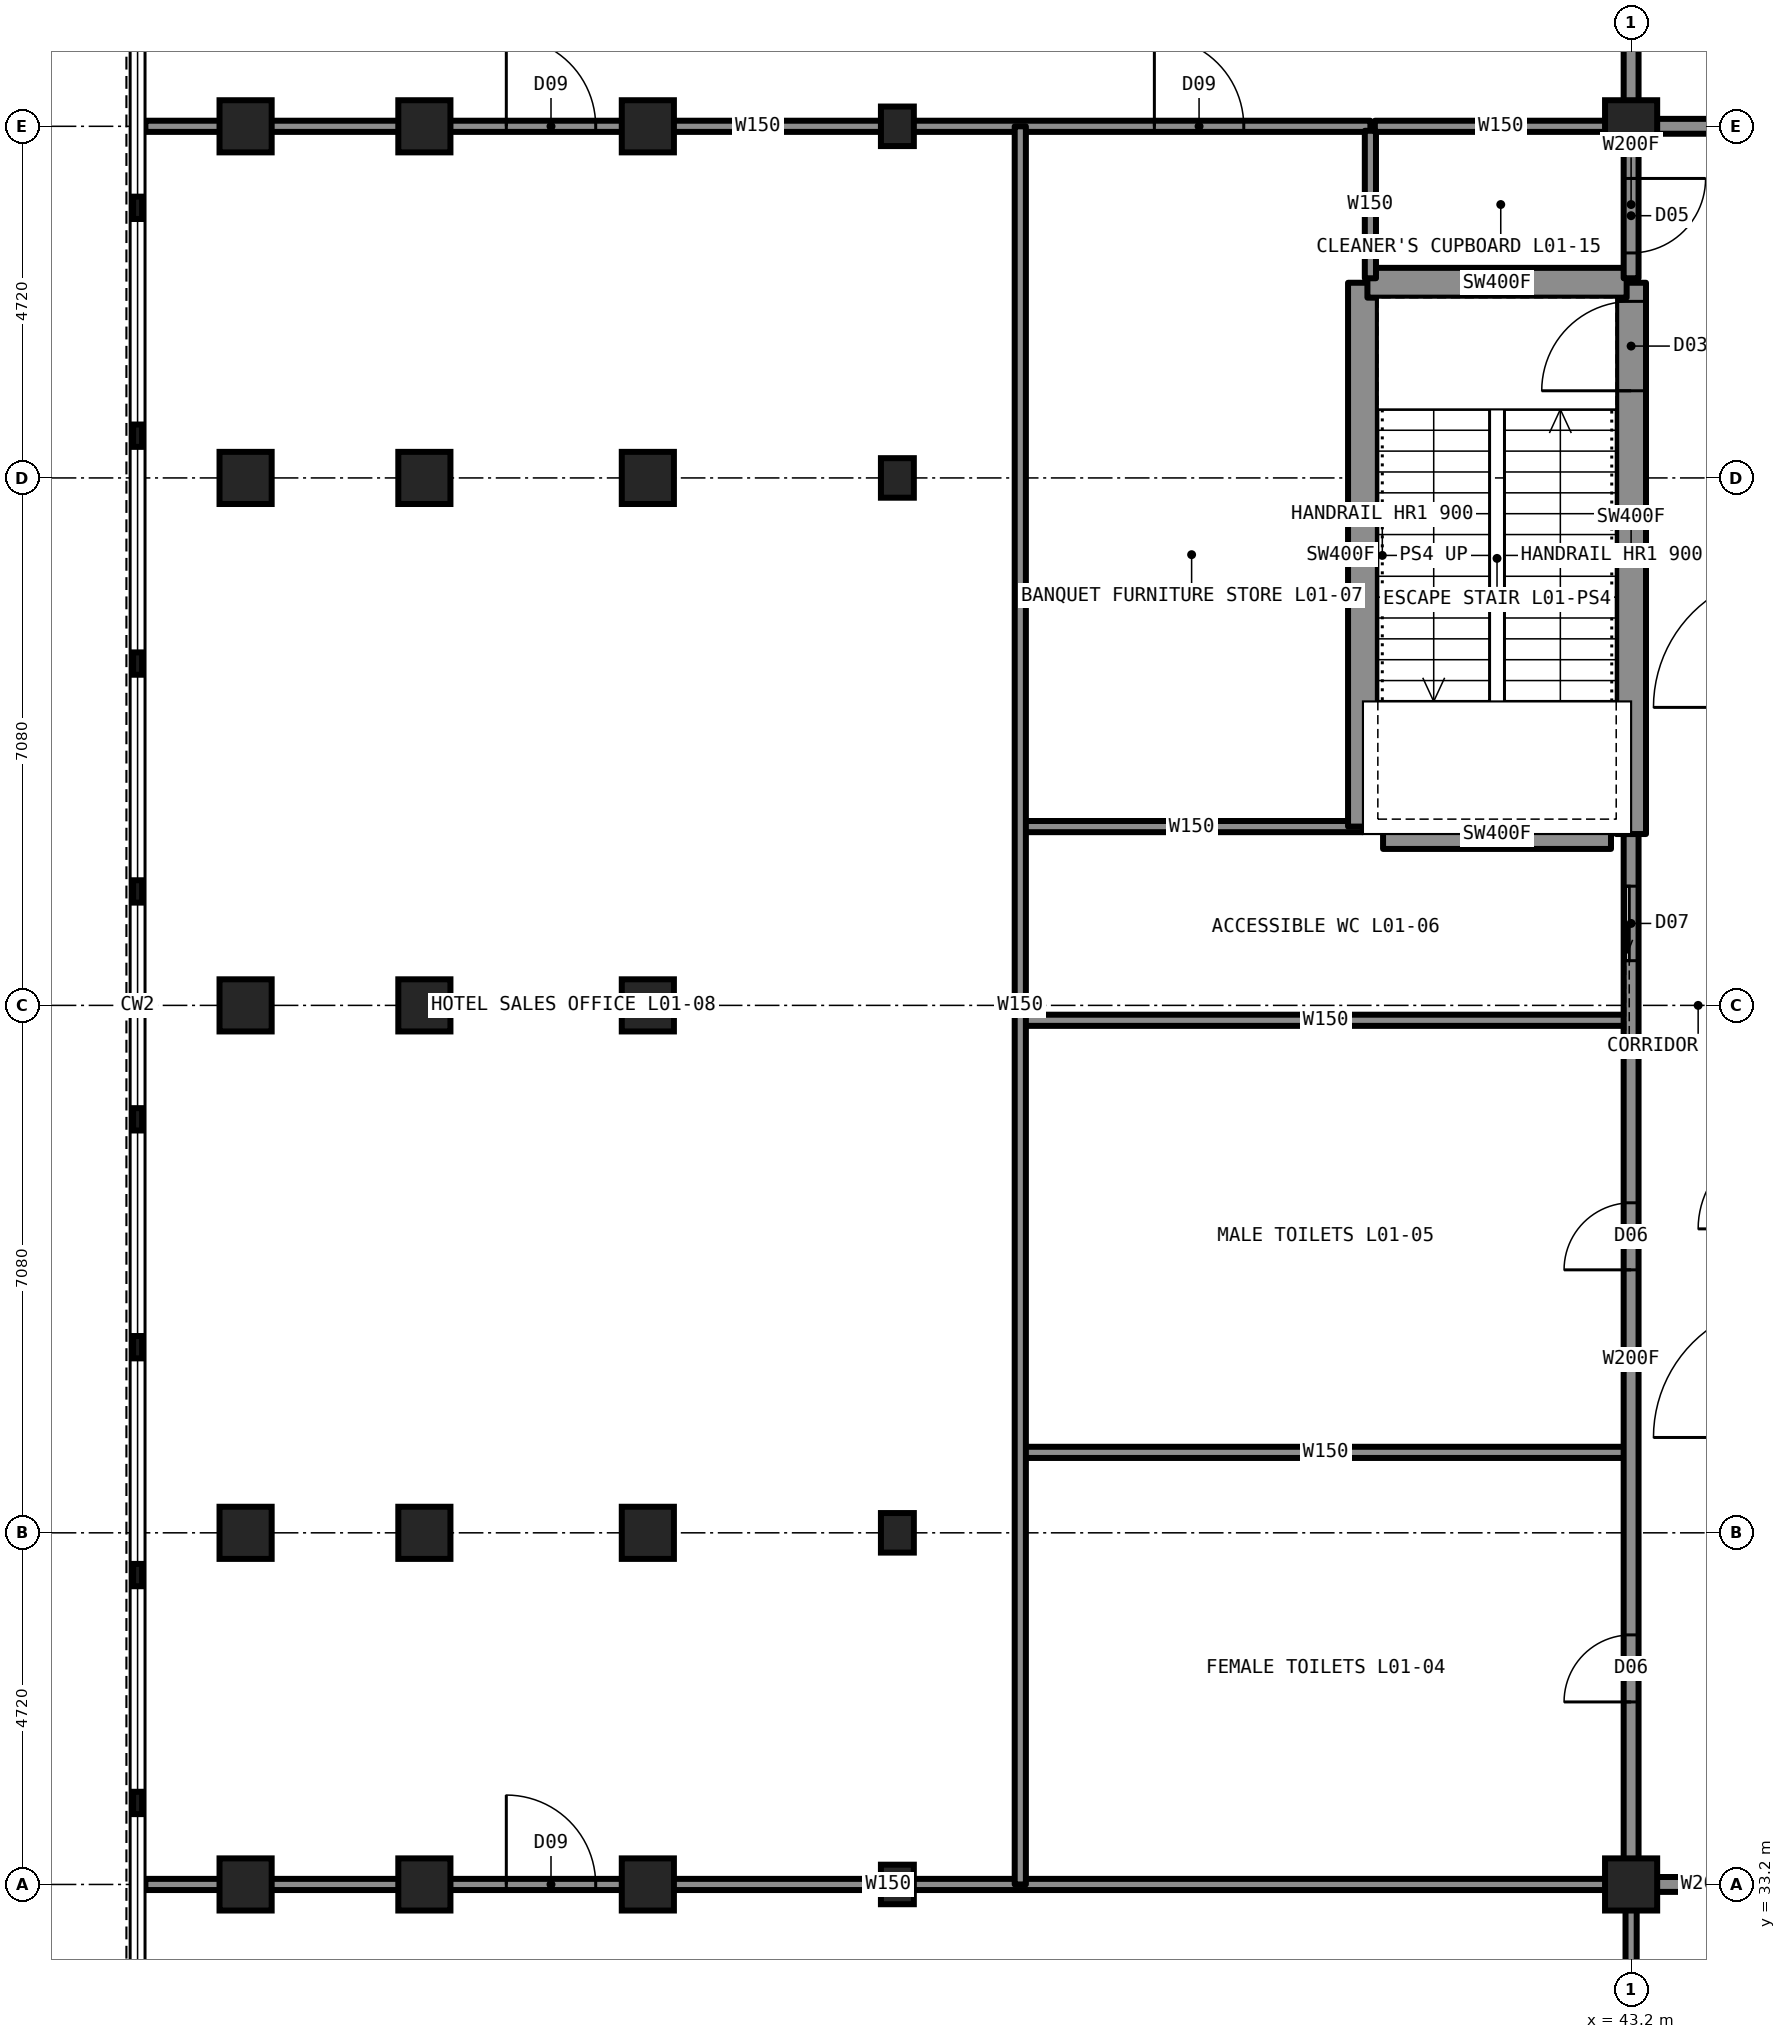
"""IFC4 building model, lengths in metres.
Left out: names, types, materials, properties, quantities, classifications, styles, units other than length and angle.
Written with IfcOpenShell. Run it as: python <this file> out.ifc"""

import sys

from ifc_helpers import new_model, si_unit, direction, frame, frame_2d, origin, origin_2d, place, context, subcontext, project, spatial, rectangle, hollow_rectangle, i_section, extrude, element, fill, save


model = new_model("IFC4")
c1 = context("Model", 3, precision=1e-05, world=origin(), true_north=direction((0.0, 1.0)))
c2 = subcontext(c1, "Body", "Model", "MODEL_VIEW")
j1 = project(units=[si_unit("LENGTHUNIT", "METRE"), si_unit("PLANEANGLEUNIT", "RADIAN")], contexts=[c1])
p1 = place(None, origin())
s1 = spatial("IfcSite", under=j1, at=p1, CompositionType="ELEMENT")
p2 = place(p1, origin())
s2 = spatial("IfcBuilding", under=s1, at=p2, CompositionType="ELEMENT")
p3 = place(p2, frame((0.0, 0.0, 5.6)))
s3 = spatial("IfcBuildingStorey", under=s2, at=p3, CompositionType="ELEMENT", Elevation=5.6)
for number, where, z_axis, x_axis in (
    (1, (33.35, 33.2, 0.0), (0.0, 0.0, 1.0), (1.0, 0.0, 0.0)),
    (2, (33.35, 37.92, 0.0), (0.0, 0.0, 1.0), (1.0, 0.0, 0.0)),
    (3, (33.35, 52.08, 0.0), (0.0, 0.0, 1.0), (1.0, 0.0, 0.0)),
    (4, (33.35, 56.8, 0.0), (0.0, 0.0, 1.0), (1.0, 0.0, 0.0)),
):
    element("IfcColumn", number, at=place(p3, frame(where, z_axis=z_axis, x_axis=x_axis)), inside=s3, PredefinedType="COLUMN", context=c2, shape_type="SweptSolid", body=[
        extrude(i_section(OverallWidth=0.442, OverallDepth=0.531, WebThickness=0.066, FlangeThickness=0.106, at=origin_2d()), origin(), (0.0, 0.0, 1.0), 5.4),
    ])
for number, where, z_axis, x_axis in (
    (5, (43.2, 33.2, 0.0), (0.0, 0.0, 1.0), (1.0, 0.0, 0.0)),
    (6, (43.2, 56.8, 0.0), (0.0, 0.0, 1.0), (1.0, 0.0, 0.0)),
):
    element("IfcColumn", number, at=place(p3, frame(where, z_axis=z_axis, x_axis=x_axis)), inside=s3, PredefinedType="COLUMN", context=c2, shape_type="SweptSolid", body=[
        extrude(hollow_rectangle(XDim=0.7, YDim=0.7, WallThickness=0.06, at=origin_2d()), origin(), (0.0, 0.0, 1.0), 5.4),
    ])
for number, where, z_axis, x_axis in (
    (7, (24.6, 33.2, 0.0), (0.0, 0.0, 1.0), (1.0, 0.0, 0.0)),
    (8, (24.6, 37.92, 0.0), (0.0, 0.0, 1.0), (1.0, 0.0, 0.0)),
    (9, (24.6, 45.0, 0.0), (0.0, 0.0, 1.0), (1.0, 0.0, 0.0)),
    (10, (24.6, 52.08, 0.0), (0.0, 0.0, 1.0), (1.0, 0.0, 0.0)),
    (11, (24.6, 56.8, 0.0), (0.0, 0.0, 1.0), (1.0, 0.0, 0.0)),
    (12, (27.0, 33.2, 0.0), (0.0, 0.0, 1.0), (1.0, 0.0, 0.0)),
    (13, (27.0, 37.92, 0.0), (0.0, 0.0, 1.0), (1.0, 0.0, 0.0)),
    (14, (27.0, 45.0, 0.0), (0.0, 0.0, 1.0), (1.0, 0.0, 0.0)),
    (15, (27.0, 52.08, 0.0), (0.0, 0.0, 1.0), (1.0, 0.0, 0.0)),
    (16, (27.0, 56.8, 0.0), (0.0, 0.0, 1.0), (1.0, 0.0, 0.0)),
    (17, (30.0, 33.2, 0.0), (0.0, 0.0, 1.0), (1.0, 0.0, 0.0)),
    (18, (30.0, 37.92, 0.0), (0.0, 0.0, 1.0), (1.0, 0.0, 0.0)),
    (19, (30.0, 45.0, 0.0), (0.0, 0.0, 1.0), (1.0, 0.0, 0.0)),
    (20, (30.0, 52.08, 0.0), (0.0, 0.0, 1.0), (1.0, 0.0, 0.0)),
    (21, (30.0, 56.8, 0.0), (0.0, 0.0, 1.0), (1.0, 0.0, 0.0)),
):
    element("IfcColumn", number, at=place(p3, frame(where, z_axis=z_axis, x_axis=x_axis)), inside=s3, PredefinedType="COLUMN", context=c2, shape_type="SweptSolid", body=[
        extrude(rectangle(XDim=0.7, YDim=0.7, at=origin_2d()), origin(), (0.0, 0.0, 1.0), 5.4),
    ])
p4 = place(p3, frame((35.0, 44.8, 0.0), z_axis=(0.0, 0.0, 1.0), x_axis=(1.0, 0.0, 0.0)))
e22 = element("IfcWall", 22, at=p4, inside=s3, PredefinedType="PARTITIONING", context=c2, shape_type="SweptSolid", body=[
    extrude(rectangle(XDim=8.2, YDim=0.15, at=frame_2d((4.1, 0.0))), origin(), (0.0, 0.0, 1.0), 5.05),
])
p5 = place(p3, frame((43.2, 33.2, 0.0), z_axis=(0.0, 0.0, 1.0), x_axis=(1.0, 0.0, 0.0)))
e23 = element("IfcWall", 23, at=p5, inside=s3, PredefinedType="PARTITIONING", context=c2, shape_type="SweptSolid", body=[
    extrude(rectangle(XDim=2.1, YDim=0.2, at=frame_2d((1.05, 0.0))), origin(), (0.0, 0.0, 1.0), 5.05),
])
p6 = place(p3, frame((23.255, 33.2, 0.0), z_axis=(0.0, 0.0, 1.0), x_axis=(1.0, 0.0, 0.0)))
e24 = element("IfcWall", 24, at=p6, inside=s3, PredefinedType="PARTITIONING", context=c2, shape_type="SweptSolid", body=[
    extrude(rectangle(XDim=19.945, YDim=0.15, at=frame_2d((9.973, 0.0))), origin(), (0.0, 0.0, 1.0), 5.05),
])
p7 = place(p6, frame((4.845, 0.0, 0.0)))
e25 = element("IfcOpeningElement", 25, at=p7, cuts=e24, PredefinedType="OPENING", context=c2, shape_type="SweptSolid", body=[
    extrude(rectangle(XDim=1.2, YDim=2.2, at=frame_2d((0.6, 1.1))), frame((0.0, 0.085, 0.0), z_axis=(0.0, -1.0, 0.0), x_axis=(1.0, 0.0, 0.0)), (0.0, 0.0, 1.0), 0.17),
])
p8 = place(p3, frame((35.0, 39.0, 0.0), z_axis=(0.0, 0.0, 1.0), x_axis=(1.0, 0.0, 0.0)))
e26 = element("IfcWall", 26, at=p8, inside=s3, PredefinedType="PARTITIONING", context=c2, shape_type="SweptSolid", body=[
    extrude(rectangle(XDim=8.2, YDim=0.15, at=frame_2d((4.1, 0.0))), origin(), (0.0, 0.0, 1.0), 5.05),
])
p9 = place(p3, frame((43.2, 56.8, 0.0), z_axis=(0.0, 0.0, 1.0), x_axis=(1.0, 0.0, 0.0)))
e27 = element("IfcWall", 27, at=p9, inside=s3, PredefinedType="PARTITIONING", context=c2, shape_type="SweptSolid", body=[
    extrude(rectangle(XDim=14.1, YDim=0.2, at=frame_2d((7.05, 0.0))), origin(), (0.0, 0.0, 1.0), 5.05),
])
p10 = place(p9, frame((5.3, 0.0, 0.0)))
e28 = element("IfcOpeningElement", 28, at=p10, cuts=e27, PredefinedType="OPENING", context=c2, shape_type="SweptSolid", body=[
    extrude(rectangle(XDim=1.0, YDim=2.1, at=frame_2d((0.5, 1.05))), frame((0.0, 0.11, 0.0), z_axis=(0.0, -1.0, 0.0), x_axis=(1.0, 0.0, 0.0)), (0.0, 0.0, 1.0), 0.22),
])
p11 = place(p3, frame((23.255, 56.8, 0.0), z_axis=(0.0, 0.0, 1.0), x_axis=(1.0, 0.0, 0.0)))
e29 = element("IfcWall", 29, at=p11, inside=s3, PredefinedType="PARTITIONING", context=c2, shape_type="SweptSolid", body=[
    extrude(rectangle(XDim=16.445, YDim=0.15, at=frame_2d((8.223, 0.0))), origin(), (0.0, 0.0, 1.0), 5.05),
])
p12 = place(p11, frame((13.545, 0.0, 0.0)))
e30 = element("IfcOpeningElement", 30, at=p12, cuts=e29, PredefinedType="OPENING", context=c2, shape_type="SweptSolid", body=[
    extrude(rectangle(XDim=1.2, YDim=2.2, at=frame_2d((0.6, 1.1))), frame((0.0, 0.085, 0.0), z_axis=(0.0, -1.0, 0.0), x_axis=(1.0, 0.0, 0.0)), (0.0, 0.0, 1.0), 0.17),
])
p13 = place(p11, frame((4.845, 0.0, 0.0)))
e31 = element("IfcOpeningElement", 31, at=p13, cuts=e29, PredefinedType="OPENING", context=c2, shape_type="SweptSolid", body=[
    extrude(rectangle(XDim=1.2, YDim=2.2, at=frame_2d((0.6, 1.1))), frame((0.0, 0.085, 0.0), z_axis=(0.0, -1.0, 0.0), x_axis=(1.0, 0.0, 0.0)), (0.0, 0.0, 1.0), 0.17),
])
p14 = place(p3, frame((39.87, 47.3, 0.0), z_axis=(0.0, 0.0, 1.0), x_axis=(1.0, 0.0, 0.0)))
e32 = element("IfcWall", 32, at=p14, inside=s3, PredefinedType="SHEAR", context=c2, shape_type="SweptSolid", body=[
    extrude(rectangle(XDim=3.06, YDim=0.4, at=frame_2d((1.53, 0.0))), origin(), (0.0, 0.0, 1.0), 5.4),
])
p15 = place(p3, frame((35.0, 47.4, 0.0), z_axis=(0.0, 0.0, 1.0), x_axis=(1.0, 0.0, 0.0)))
e33 = element("IfcWall", 33, at=p15, inside=s3, PredefinedType="PARTITIONING", context=c2, shape_type="SweptSolid", body=[
    extrude(rectangle(XDim=4.6, YDim=0.15, at=frame_2d((2.3, 0.0))), origin(), (0.0, 0.0, 1.0), 5.05),
])
p16 = place(p3, frame((43.2, 33.2, 0.0), z_axis=(0.0, 0.0, 1.0), x_axis=(0.0, 1.0, 0.0)))
e34 = element("IfcWall", 34, at=p16, inside=s3, PredefinedType="PARTITIONING", context=c2, shape_type="SweptSolid", body=[
    extrude(rectangle(XDim=14.1, YDim=0.2, at=frame_2d((7.05, 0.0))), origin(), (0.0, 0.0, 1.0), 5.05),
])
p17 = place(p16, frame((12.4, 0.0, 0.0)))
e35 = element("IfcOpeningElement", 35, at=p17, cuts=e34, PredefinedType="OPENING", context=c2, shape_type="SweptSolid", body=[
    extrude(rectangle(XDim=1.0, YDim=2.1, at=frame_2d((0.5, 1.05))), frame((0.0, 0.11, 0.0), z_axis=(0.0, -1.0, 0.0), x_axis=(1.0, 0.0, 0.0)), (0.0, 0.0, 1.0), 0.22),
])
p18 = place(p16, frame((2.45, 0.0, 0.0)))
e36 = element("IfcOpeningElement", 36, at=p18, cuts=e34, PredefinedType="OPENING", context=c2, shape_type="SweptSolid", body=[
    extrude(rectangle(XDim=0.9, YDim=2.1, at=frame_2d((0.45, 1.05))), frame((0.0, 0.11, 0.0), z_axis=(0.0, -1.0, 0.0), x_axis=(1.0, 0.0, 0.0)), (0.0, 0.0, 1.0), 0.22),
])
p19 = place(p16, frame((8.25, 0.0, 0.0)))
e37 = element("IfcOpeningElement", 37, at=p19, cuts=e34, PredefinedType="OPENING", context=c2, shape_type="SweptSolid", body=[
    extrude(rectangle(XDim=0.9, YDim=2.1, at=frame_2d((0.45, 1.05))), frame((0.0, 0.11, 0.0), z_axis=(0.0, -1.0, 0.0), x_axis=(1.0, 0.0, 0.0)), (0.0, 0.0, 1.0), 0.22),
])
p20 = place(p3, frame((43.2, 56.8, 0.0), z_axis=(0.0, 0.0, 1.0), x_axis=(0.0, 1.0, 0.0)))
e38 = element("IfcWall", 38, at=p20, inside=s3, PredefinedType="PARTITIONING", context=c2, shape_type="SweptSolid", body=[
    extrude(rectangle(XDim=13.9, YDim=0.2, at=frame_2d((6.95, 0.0))), origin(), (0.0, 0.0, 1.0), 5.05),
])
p21 = place(p20, frame((6.6, 0.0, 0.0)))
e39 = element("IfcOpeningElement", 39, at=p21, cuts=e38, PredefinedType="OPENING", context=c2, shape_type="SweptSolid", body=[
    extrude(rectangle(XDim=1.2, YDim=2.2, at=frame_2d((0.6, 1.1))), frame((0.0, 0.11, 0.0), z_axis=(0.0, -1.0, 0.0), x_axis=(1.0, 0.0, 0.0)), (0.0, 0.0, 1.0), 0.22),
])
p22 = place(p3, frame((43.2, 19.3, 0.0), z_axis=(0.0, 0.0, 1.0), x_axis=(0.0, 1.0, 0.0)))
e40 = element("IfcWall", 40, at=p22, inside=s3, PredefinedType="PARTITIONING", context=c2, shape_type="SweptSolid", body=[
    extrude(rectangle(XDim=13.9, YDim=0.15, at=frame_2d((6.95, 0.0))), origin(), (0.0, 0.0, 1.0), 5.05),
])
p23 = place(p22, frame((5.9, 0.0, 0.0)))
e41 = element("IfcOpeningElement", 41, at=p23, cuts=e40, PredefinedType="OPENING", context=c2, shape_type="SweptSolid", body=[
    extrude(rectangle(XDim=1.6, YDim=2.4, at=frame_2d((0.8, 1.2))), frame((0.0, 0.085, 0.0), z_axis=(0.0, -1.0, 0.0), x_axis=(1.0, 0.0, 0.0)), (0.0, 0.0, 1.0), 0.17),
])
p24 = place(p3, frame((43.2, 47.3, 0.0), z_axis=(0.0, 0.0, 1.0), x_axis=(0.0, 1.0, 0.0)))
e42 = element("IfcWall", 42, at=p24, inside=s3, PredefinedType="SHEAR", context=c2, shape_type="SweptSolid", body=[
    extrude(rectangle(XDim=7.4, YDim=0.4, at=frame_2d((3.7, 0.0))), origin(), (0.0, 0.0, 1.0), 5.4),
])
p25 = place(p24, frame((5.95, 0.0, 0.0)))
e43 = element("IfcOpeningElement", 43, at=p25, cuts=e42, PredefinedType="OPENING", context=c2, shape_type="SweptSolid", body=[
    extrude(rectangle(XDim=1.2, YDim=2.2, at=frame_2d((0.6, 1.1))), frame((0.0, 0.21, 0.0), z_axis=(0.0, -1.0, 0.0), x_axis=(1.0, 0.0, 0.0)), (0.0, 0.0, 1.0), 0.42),
])
p26 = place(p3, frame((39.6, 47.4, 0.0), z_axis=(0.0, 0.0, 1.0), x_axis=(0.0, 1.0, 0.0)))
e44 = element("IfcWall", 44, at=p26, inside=s3, PredefinedType="SHEAR", context=c2, shape_type="SweptSolid", body=[
    extrude(rectangle(XDim=7.3, YDim=0.4, at=frame_2d((3.65, 0.0))), origin(), (0.0, 0.0, 1.0), 5.4),
])
p27 = place(p3, frame((35.0, 33.2, 0.0), z_axis=(0.0, 0.0, 1.0), x_axis=(0.0, 1.0, 0.0)))
e45 = element("IfcWall", 45, at=p27, inside=s3, PredefinedType="PARTITIONING", context=c2, shape_type="SweptSolid", body=[
    extrude(rectangle(XDim=23.6, YDim=0.15, at=frame_2d((11.8, 0.0))), origin(), (0.0, 0.0, 1.0), 5.05),
])
p28 = place(p3, frame((43.14, 54.7, 0.0), z_axis=(0.0, 0.0, 1.0), x_axis=(-1.0, 0.0, 0.0)))
e46 = element("IfcWall", 46, at=p28, inside=s3, PredefinedType="SHEAR", context=c2, shape_type="SweptSolid", body=[
    extrude(rectangle(XDim=3.48, YDim=0.4, at=frame_2d((1.74, 0.0))), origin(), (0.0, 0.0, 1.0), 5.4),
])
p29 = place(p3, frame((43.2, 56.74, 0.0), z_axis=(0.0, 0.0, 1.0), x_axis=(0.0, -1.0, 0.0)))
e47 = element("IfcWall", 47, at=p29, inside=s3, PredefinedType="PARTITIONING", context=c2, shape_type="SweptSolid", body=[
    extrude(rectangle(XDim=1.98, YDim=0.2, at=frame_2d((0.99, 0.0))), origin(), (0.0, 0.0, 1.0), 5.05),
])
p30 = place(p29, frame((0.64, 0.0, 0.0)))
e48 = element("IfcOpeningElement", 48, at=p30, cuts=e47, PredefinedType="OPENING", context=c2, shape_type="SweptSolid", body=[
    extrude(rectangle(XDim=1.0, YDim=2.1, at=frame_2d((0.5, 1.05))), frame((0.0, 0.11, 0.0), z_axis=(0.0, -1.0, 0.0), x_axis=(1.0, 0.0, 0.0)), (0.0, 0.0, 1.0), 0.22),
])
p31 = place(p3, frame((39.7, 54.76, 0.0), z_axis=(0.0, 0.0, 1.0), x_axis=(0.0, 1.0, 0.0)))
e49 = element("IfcWall", 49, at=p31, inside=s3, PredefinedType="PARTITIONING", context=c2, shape_type="SweptSolid", body=[
    extrude(rectangle(XDim=1.98, YDim=0.15, at=frame_2d((0.99, 0.0))), origin(), (0.0, 0.0, 1.0), 5.05),
])
p32 = place(p3, frame((39.76, 56.8, 0.0), z_axis=(0.0, 0.0, 1.0), x_axis=(1.0, 0.0, 0.0)))
e50 = element("IfcWall", 50, at=p32, inside=s3, PredefinedType="PARTITIONING", context=c2, shape_type="SweptSolid", body=[
    extrude(rectangle(XDim=3.38, YDim=0.15, at=frame_2d((1.69, 0.0))), origin(), (0.0, 0.0, 1.0), 5.05),
])
p33 = place(p25, origin())
e51 = element("IfcDoor", 51, at=p33, inside=s3, OperationType="SINGLE_SWING_LEFT", PredefinedType="DOOR", context=c2, shape_type="SweptSolid", body=[
    extrude(rectangle(XDim=1.2, YDim=2.2, at=frame_2d((0.6, 1.1))), frame((0.0, 0.025, 0.0), z_axis=(0.0, -1.0, 0.0), x_axis=(1.0, 0.0, 0.0)), (0.0, 0.0, 1.0), 0.05),
])
fill(e43, e51)
p34 = place(p12, origin())
e52 = element("IfcDoor", 52, at=p34, inside=s3, OperationType="SINGLE_SWING_LEFT", PredefinedType="DOOR", context=c2, shape_type="SweptSolid", body=[
    extrude(rectangle(XDim=1.2, YDim=2.2, at=frame_2d((0.6, 1.1))), frame((0.0, 0.025, 0.0), z_axis=(0.0, -1.0, 0.0), x_axis=(1.0, 0.0, 0.0)), (0.0, 0.0, 1.0), 0.05),
])
fill(e30, e52)
p35 = place(p13, origin())
e53 = element("IfcDoor", 53, at=p35, inside=s3, OperationType="SINGLE_SWING_LEFT", PredefinedType="DOOR", context=c2, shape_type="SweptSolid", body=[
    extrude(rectangle(XDim=1.2, YDim=2.2, at=frame_2d((0.6, 1.1))), frame((0.0, 0.025, 0.0), z_axis=(0.0, -1.0, 0.0), x_axis=(1.0, 0.0, 0.0)), (0.0, 0.0, 1.0), 0.05),
])
fill(e31, e53)
p36 = place(p7, origin())
e54 = element("IfcDoor", 54, at=p36, inside=s3, OperationType="SINGLE_SWING_LEFT", PredefinedType="DOOR", context=c2, shape_type="SweptSolid", body=[
    extrude(rectangle(XDim=1.2, YDim=2.2, at=frame_2d((0.6, 1.1))), frame((0.0, 0.025, 0.0), z_axis=(0.0, -1.0, 0.0), x_axis=(1.0, 0.0, 0.0)), (0.0, 0.0, 1.0), 0.05),
])
fill(e25, e54)
p37 = place(p30, origin())
e55 = element("IfcDoor", 55, at=p37, inside=s3, OperationType="SINGLE_SWING_LEFT", PredefinedType="DOOR", context=c2, shape_type="SweptSolid", body=[
    extrude(rectangle(XDim=1.0, YDim=2.1, at=frame_2d((0.5, 1.05))), frame((0.0, 0.025, 0.0), z_axis=(0.0, -1.0, 0.0), x_axis=(1.0, 0.0, 0.0)), (0.0, 0.0, 1.0), 0.05),
])
fill(e48, e55)
p38 = place(p17, origin())
e56 = element("IfcDoor", 56, at=p38, inside=s3, OperationType="SLIDING_TO_LEFT", PredefinedType="DOOR", context=c2, shape_type="SweptSolid", body=[
    extrude(rectangle(XDim=1.0, YDim=2.1, at=frame_2d((0.5, 1.05))), frame((0.0, 0.025, 0.0), z_axis=(0.0, -1.0, 0.0), x_axis=(1.0, 0.0, 0.0)), (0.0, 0.0, 1.0), 0.05),
])
fill(e35, e56)
p39 = place(p18, origin())
e57 = element("IfcDoor", 57, at=p39, inside=s3, OperationType="SINGLE_SWING_LEFT", PredefinedType="DOOR", context=c2, shape_type="SweptSolid", body=[
    extrude(rectangle(XDim=0.9, YDim=2.1, at=frame_2d((0.45, 1.05))), frame((0.0, 0.025, 0.0), z_axis=(0.0, -1.0, 0.0), x_axis=(1.0, 0.0, 0.0)), (0.0, 0.0, 1.0), 0.05),
])
fill(e36, e57)
p40 = place(p19, origin())
e58 = element("IfcDoor", 58, at=p40, inside=s3, OperationType="SINGLE_SWING_LEFT", PredefinedType="DOOR", context=c2, shape_type="SweptSolid", body=[
    extrude(rectangle(XDim=0.9, YDim=2.1, at=frame_2d((0.45, 1.05))), frame((0.0, 0.025, 0.0), z_axis=(0.0, -1.0, 0.0), x_axis=(1.0, 0.0, 0.0)), (0.0, 0.0, 1.0), 0.05),
])
fill(e37, e58)
save(model, sys.argv[1])
